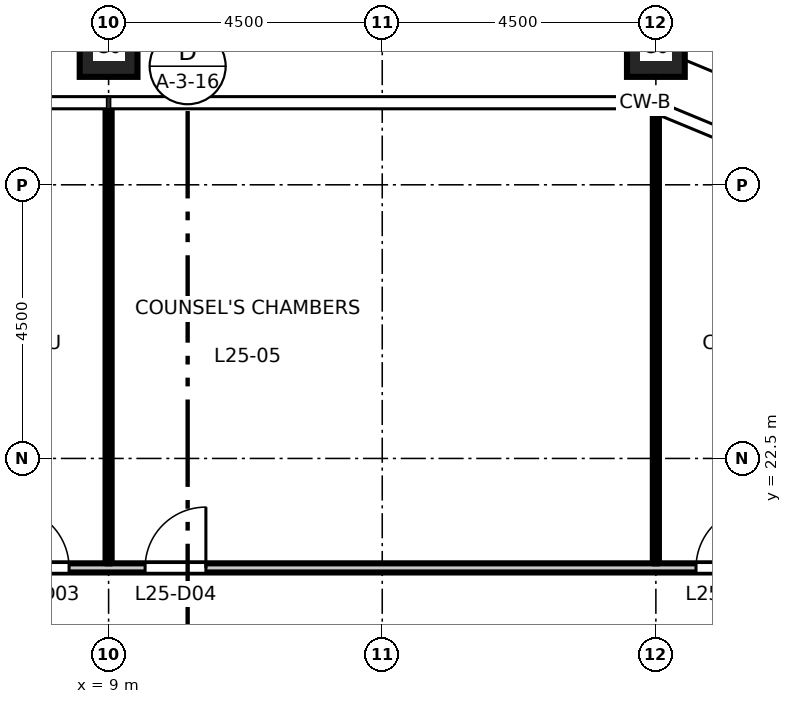
"""IFC4 building model, lengths in metres.
Left out: names, types, materials, properties, quantities, classifications, styles, units other than length and angle.
Written with IfcOpenShell. Run it as: python <this file> out.ifc"""

import sys

from ifc_helpers import new_model, si_unit, direction, frame, frame_2d, origin, origin_2d, place, context, subcontext, project, spatial, rectangle, hollow_rectangle, extrude, element, fill, save


model = new_model("IFC4")
c1 = context("Model", 3, precision=1e-05, world=origin(), true_north=direction((0.0, 1.0)))
c2 = subcontext(c1, "Body", "Model", "MODEL_VIEW")
j1 = project(units=[si_unit("LENGTHUNIT", "METRE"), si_unit("PLANEANGLEUNIT", "RADIAN")], contexts=[c1])
p1 = place(None, origin())
s1 = spatial("IfcSite", under=j1, at=p1, CompositionType="ELEMENT")
p2 = place(p1, origin())
s2 = spatial("IfcBuilding", under=s1, at=p2, CompositionType="ELEMENT")
p3 = place(p2, frame((0.0, 0.0, 118.2)))
s3 = spatial("IfcBuildingStorey", under=s2, at=p3, CompositionType="ELEMENT", Elevation=118.2)
for number, where, z_axis, x_axis in (
    (1, (18.0, 29.25, 0.0), (0.0, 0.0, 1.0), (1.0, 0.0, 0.0)),
    (2, (9.0, 29.25, 0.0), (0.0, 0.0, 1.0), (1.0, 0.0, 0.0)),
):
    element("IfcColumn", number, at=place(p3, frame(where, z_axis=z_axis, x_axis=x_axis)), inside=s3, PredefinedType="COLUMN", context=c2, shape_type="SweptSolid", body=[
        extrude(hollow_rectangle(XDim=0.95, YDim=0.95, WallThickness=0.055, at=origin_2d()), origin(), (0.0, 0.0, 1.0), 4.5),
    ])
p4 = place(p3, frame((-27.06, 20.7, 0.0), z_axis=(0.0, 0.0, 1.0), x_axis=(1.0, 0.0, 0.0)))
e3 = element("IfcWall", 3, at=p4, inside=s3, PredefinedType="PARTITIONING", context=c2, shape_type="SweptSolid", body=[
    extrude(rectangle(XDim=54.12, YDim=0.15, at=frame_2d((27.06, 0.0))), origin(), (0.0, 0.0, 1.0), 4.35),
])
p5 = place(p4, frame((16.41, 0.0, 0.0)))
e4 = element("IfcOpeningElement", 4, at=p5, cuts=e3, PredefinedType="OPENING", context=c2, shape_type="SweptSolid", body=[
    extrude(rectangle(XDim=1.0, YDim=2.1, at=frame_2d((0.5, 1.05))), frame((0.0, 0.085, 0.0), z_axis=(0.0, -1.0, 0.0), x_axis=(1.0, 0.0, 0.0)), (0.0, 0.0, 1.0), 0.17),
])
p6 = place(p4, frame((18.66, 0.0, 0.0)))
e5 = element("IfcOpeningElement", 5, at=p6, cuts=e3, PredefinedType="OPENING", context=c2, shape_type="SweptSolid", body=[
    extrude(rectangle(XDim=1.0, YDim=2.1, at=frame_2d((0.5, 1.05))), frame((0.0, 0.085, 0.0), z_axis=(0.0, -1.0, 0.0), x_axis=(1.0, 0.0, 0.0)), (0.0, 0.0, 1.0), 0.17),
])
p7 = place(p4, frame((34.41, 0.0, 0.0)))
e6 = element("IfcOpeningElement", 6, at=p7, cuts=e3, PredefinedType="OPENING", context=c2, shape_type="SweptSolid", body=[
    extrude(rectangle(XDim=1.0, YDim=2.1, at=frame_2d((0.5, 1.05))), frame((0.0, 0.085, 0.0), z_axis=(0.0, -1.0, 0.0), x_axis=(1.0, 0.0, 0.0)), (0.0, 0.0, 1.0), 0.17),
])
p8 = place(p4, frame((36.66, 0.0, 0.0)))
e7 = element("IfcOpeningElement", 7, at=p8, cuts=e3, PredefinedType="OPENING", context=c2, shape_type="SweptSolid", body=[
    extrude(rectangle(XDim=1.0, YDim=2.1, at=frame_2d((0.5, 1.05))), frame((0.0, 0.085, 0.0), z_axis=(0.0, -1.0, 0.0), x_axis=(1.0, 0.0, 0.0)), (0.0, 0.0, 1.0), 0.17),
])
p9 = place(p4, frame((7.41, 0.0, 0.0)))
e8 = element("IfcOpeningElement", 8, at=p9, cuts=e3, PredefinedType="OPENING", context=c2, shape_type="SweptSolid", body=[
    extrude(rectangle(XDim=1.0, YDim=2.1, at=frame_2d((0.5, 1.05))), frame((0.0, 0.085, 0.0), z_axis=(0.0, -1.0, 0.0), x_axis=(1.0, 0.0, 0.0)), (0.0, 0.0, 1.0), 0.17),
])
p10 = place(p4, frame((45.72, 0.0, 0.0)))
e9 = element("IfcOpeningElement", 9, at=p10, cuts=e3, PredefinedType="OPENING", context=c2, shape_type="SweptSolid", body=[
    extrude(rectangle(XDim=1.0, YDim=2.1, at=frame_2d((0.5, 1.05))), frame((0.0, 0.085, 0.0), z_axis=(0.0, -1.0, 0.0), x_axis=(1.0, 0.0, 0.0)), (0.0, 0.0, 1.0), 0.17),
])
p11 = place(p3, frame((9.0, 20.775, 0.0), z_axis=(0.0, 0.0, 1.0), x_axis=(0.0, 1.0, 0.0)))
e10 = element("IfcWall", 10, at=p11, inside=s3, PredefinedType="PARTITIONING", context=c2, shape_type="SweptSolid", body=[
    extrude(rectangle(XDim=7.485, YDim=0.1, at=frame_2d((3.743, 0.0))), origin(), (0.0, 0.0, 1.0), 3.45),
])
p12 = place(p3, frame((18.0, 20.775, 0.0), z_axis=(0.0, 0.0, 1.0), x_axis=(0.0, 1.0, 0.0)))
e11 = element("IfcWall", 11, at=p12, inside=s3, PredefinedType="PARTITIONING", context=c2, shape_type="SweptSolid", body=[
    extrude(rectangle(XDim=7.403, YDim=0.1, at=frame_2d((3.702, 0.0))), origin(), (0.0, 0.0, 1.0), 3.45),
])
p13 = place(p7, origin())
e12 = element("IfcDoor", 12, at=p13, inside=s3, OperationType="SINGLE_SWING_LEFT", PredefinedType="DOOR", context=c2, shape_type="SweptSolid", body=[
    extrude(rectangle(XDim=1.0, YDim=2.1, at=frame_2d((0.5, 1.05))), frame((0.0, 0.025, 0.0), z_axis=(0.0, -1.0, 0.0), x_axis=(1.0, 0.0, 0.0)), (0.0, 0.0, 1.0), 0.05),
])
fill(e6, e12)
p14 = place(p8, origin())
e13 = element("IfcDoor", 13, at=p14, inside=s3, OperationType="SINGLE_SWING_RIGHT", PredefinedType="DOOR", context=c2, shape_type="SweptSolid", body=[
    extrude(rectangle(XDim=1.0, YDim=2.1, at=frame_2d((0.5, 1.05))), frame((0.0, 0.025, 0.0), z_axis=(0.0, -1.0, 0.0), x_axis=(1.0, 0.0, 0.0)), (0.0, 0.0, 1.0), 0.05),
])
fill(e7, e13)
p15 = place(p10, origin())
e14 = element("IfcDoor", 14, at=p15, inside=s3, OperationType="SINGLE_SWING_RIGHT", PredefinedType="DOOR", context=c2, shape_type="SweptSolid", body=[
    extrude(rectangle(XDim=1.0, YDim=2.1, at=frame_2d((0.5, 1.05))), frame((0.0, 0.025, 0.0), z_axis=(0.0, -1.0, 0.0), x_axis=(1.0, 0.0, 0.0)), (0.0, 0.0, 1.0), 0.05),
])
fill(e9, e14)
save(model, sys.argv[1])
